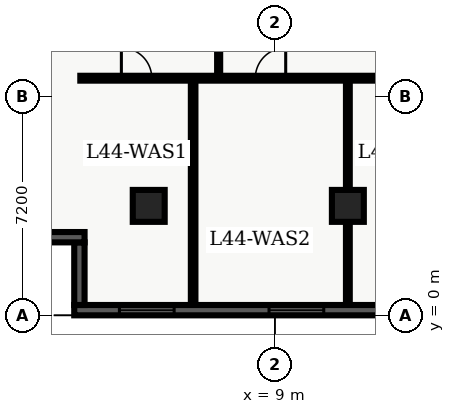
"""IFC4 building model, lengths in metres.
Left out: names, types, materials, properties, quantities, classifications, styles, units other than length and angle.
Written with IfcOpenShell. Run it as: python <this file> out.ifc"""

import sys

from ifc_helpers import new_model, entity, si_unit, converted_unit, direction, frame, origin_with_axes, origin_2d_with_axis, place, context, subcontext, project, spatial, polyline, rectangle, outline, extrude, element, fill, save


model = new_model("IFC4")
c1 = context("Model", 3, precision=1e-05, world=origin_with_axes(), true_north=direction((0.0, 1.0)))
c2 = subcontext(c1, "Body", "Model", "MODEL_VIEW")
j1 = project(units=[si_unit("LENGTHUNIT", "METRE"), converted_unit("PLANEANGLEUNIT", "DEGREE", entity("IfcPlaneAngleMeasure", 0.017), si_unit("PLANEANGLEUNIT", "RADIAN"), dimensions=[0, 0, 0, 0, 0, 0, 0])], contexts=[c1])
p1 = place(None, origin_with_axes())
s1 = spatial("IfcSite", under=j1, at=p1, CompositionType="ELEMENT")
p2 = place(p1, origin_with_axes())
s2 = spatial("IfcBuilding", under=s1, at=p2, CompositionType="ELEMENT")
p3 = place(p2, frame((0.0, 0.0, 179.7), z_axis=(0.0, 0.0, 1.0), x_axis=(1.0, 0.0, 0.0)))
s3 = spatial("IfcBuildingStorey", under=s2, at=p3, CompositionType="ELEMENT", Elevation=179.7)
for number, where, z_axis, x_axis in (
    (1, (11.4, 3.6, 0.0), (0.0, 0.0, 1.0), (1.0, 0.0, 0.0)),
    (2, (4.85, 3.6, 0.0), (0.0, 0.0, 1.0), (1.0, 0.0, 0.0)),
):
    element("IfcColumn", number, at=place(p3, frame(where, z_axis=z_axis, x_axis=x_axis)), inside=s3, PredefinedType="COLUMN", context=c2, shape_type="SweptSolid", body=[
        extrude(rectangle(XDim=1.05, YDim=1.05, at=origin_2d_with_axis()), origin_with_axes(), (0.0, 0.0, 1.0), 3.9),
    ])
p4 = place(p3, frame((2.6, 7.8, 0.0), z_axis=(0.0, 0.0, 1.0), x_axis=(1.0, 0.0, 0.0)))
e3 = element("IfcWall", 3, at=p4, inside=s3, PredefinedType="PARTITIONING", context=c2, shape_type="SweptSolid", body=[
    extrude(outline(polyline([(0.0, -0.08), (18.55, -0.08), (18.55, 0.08), (0.0, 0.08), (0.0, -0.08)])), origin_with_axes(), (0.0, 0.0, 1.0), 2.7),
])
p5 = place(p4, frame((1.851, 0.0, 0.0), z_axis=(0.0, 0.0, 1.0), x_axis=(1.0, 0.0, 0.0)))
e4 = element("IfcOpeningElement", 4, at=p5, cuts=e3, PredefinedType="OPENING", context=c2, shape_type="SweptSolid", body=[
    extrude(rectangle(XDim=1.0, YDim=0.18, at=origin_2d_with_axis()), origin_with_axes(), (0.0, 0.0, 1.0), 2.15),
])
p6 = place(p4, frame((6.255, 0.0, 0.0), z_axis=(0.0, 0.0, 1.0), x_axis=(1.0, 0.0, 0.0)))
e5 = element("IfcOpeningElement", 5, at=p6, cuts=e3, PredefinedType="OPENING", context=c2, shape_type="SweptSolid", body=[
    extrude(rectangle(XDim=1.0, YDim=0.18, at=origin_2d_with_axis()), origin_with_axes(), (0.0, 0.0, 1.0), 2.15),
])
p7 = place(p4, frame((10.794, 0.0, 0.0), z_axis=(0.0, 0.0, 1.0), x_axis=(1.0, 0.0, 0.0)))
e6 = element("IfcOpeningElement", 6, at=p7, cuts=e3, PredefinedType="OPENING", context=c2, shape_type="SweptSolid", body=[
    extrude(rectangle(XDim=1.0, YDim=0.18, at=origin_2d_with_axis()), origin_with_axes(), (0.0, 0.0, 1.0), 2.15),
])
p8 = place(p4, frame((15.645, 0.0, 0.0), z_axis=(0.0, 0.0, 1.0), x_axis=(1.0, 0.0, 0.0)))
e7 = element("IfcOpeningElement", 7, at=p8, cuts=e3, PredefinedType="OPENING", context=c2, shape_type="SweptSolid", body=[
    extrude(rectangle(XDim=1.0, YDim=0.18, at=origin_2d_with_axis()), origin_with_axes(), (0.0, 0.0, 1.0), 2.15),
])
p9 = place(p3, frame((7.15, 7.8, 0.0), z_axis=(0.0, 0.0, 1.0), x_axis=(0.0, 1.0, 0.0)))
e8 = element("IfcWall", 8, at=p9, inside=s3, PredefinedType="PARTITIONING", context=c2, shape_type="SweptSolid", body=[
    extrude(outline(polyline([(0.0, -0.05), (32.7, -0.05), (32.7, 0.05), (0.0, 0.05), (0.0, -0.05)])), origin_with_axes(), (0.0, 0.0, 1.0), 2.7),
])
p10 = place(p9, frame((7.098, 0.0, 0.0), z_axis=(0.0, 0.0, 1.0), x_axis=(1.0, 0.0, 0.0)))
e9 = element("IfcOpeningElement", 9, at=p10, cuts=e8, PredefinedType="OPENING", context=c2, shape_type="SweptSolid", body=[
    extrude(rectangle(XDim=1.0, YDim=0.12, at=origin_2d_with_axis()), origin_with_axes(), (0.0, 0.0, 1.0), 2.15),
])
p11 = place(p9, frame((23.317, 0.0, 0.0), z_axis=(0.0, 0.0, 1.0), x_axis=(1.0, 0.0, 0.0)))
e10 = element("IfcOpeningElement", 10, at=p11, cuts=e8, PredefinedType="OPENING", context=c2, shape_type="SweptSolid", body=[
    extrude(rectangle(XDim=1.0, YDim=0.12, at=origin_2d_with_axis()), origin_with_axes(), (0.0, 0.0, 1.0), 2.15),
])
p12 = place(p3, frame((6.311, 0.335, 0.0), z_axis=(0.0, 0.0, 1.0), x_axis=(0.0, 1.0, 0.0)))
e11 = element("IfcWall", 11, at=p12, inside=s3, PredefinedType="PARTITIONING", context=c2, shape_type="SweptSolid", body=[
    extrude(outline(polyline([(0.0, -0.075), (7.365, -0.075), (7.365, 0.075), (0.0, 0.075), (0.0, -0.075)])), origin_with_axes(), (0.0, 0.0, 1.0), 2.7),
])
p13 = place(p3, frame((11.4, 0.335, 0.0), z_axis=(0.0, 0.0, 1.0), x_axis=(0.0, 1.0, 0.0)))
e12 = element("IfcWall", 12, at=p13, inside=s3, PredefinedType="PARTITIONING", context=c2, shape_type="SweptSolid", body=[
    extrude(outline(polyline([(0.0, -0.062), (7.365, -0.062), (7.365, 0.062), (0.0, 0.062), (0.0, -0.062)])), origin_with_axes(), (0.0, 0.0, 1.0), 2.7),
])
p14 = place(p3, frame((57.26, 0.17, 0.0), z_axis=(0.0, 0.0, 1.0), x_axis=(-1.0, 0.0, 0.0)))
e13 = element("IfcWall", 13, at=p14, inside=s3, PredefinedType="SOLIDWALL", context=c2, shape_type="SweptSolid", body=[
    extrude(outline(polyline([(0.0, -0.17), (54.86, -0.17), (54.86, 0.17), (0.0, 0.17), (0.0, -0.17)])), origin_with_axes(), (0.0, 0.0, 1.0), 3.66),
])
p15 = place(p14, frame((2.836, 0.0, 0.45), z_axis=(0.0, 0.0, 1.0), x_axis=(1.0, 0.0, 0.0)))
e14 = element("IfcOpeningElement", 14, at=p15, cuts=e13, PredefinedType="OPENING", context=c2, shape_type="SweptSolid", body=[
    extrude(rectangle(XDim=1.8, YDim=0.36, at=origin_2d_with_axis()), origin_with_axes(), (0.0, 0.0, 1.0), 2.1),
])
p16 = place(p14, frame((7.307, 0.0, 0.45), z_axis=(0.0, 0.0, 1.0), x_axis=(1.0, 0.0, 0.0)))
e15 = element("IfcOpeningElement", 15, at=p16, cuts=e13, PredefinedType="OPENING", context=c2, shape_type="SweptSolid", body=[
    extrude(rectangle(XDim=1.8, YDim=0.36, at=origin_2d_with_axis()), origin_with_axes(), (0.0, 0.0, 1.0), 2.1),
])
p17 = place(p14, frame((11.779, 0.0, 0.45), z_axis=(0.0, 0.0, 1.0), x_axis=(1.0, 0.0, 0.0)))
e16 = element("IfcOpeningElement", 16, at=p17, cuts=e13, PredefinedType="OPENING", context=c2, shape_type="SweptSolid", body=[
    extrude(rectangle(XDim=1.8, YDim=0.36, at=origin_2d_with_axis()), origin_with_axes(), (0.0, 0.0, 1.0), 2.1),
])
p18 = place(p14, frame((16.251, 0.0, 0.45), z_axis=(0.0, 0.0, 1.0), x_axis=(1.0, 0.0, 0.0)))
e17 = element("IfcOpeningElement", 17, at=p18, cuts=e13, PredefinedType="OPENING", context=c2, shape_type="SweptSolid", body=[
    extrude(rectangle(XDim=1.8, YDim=0.36, at=origin_2d_with_axis()), origin_with_axes(), (0.0, 0.0, 1.0), 2.1),
])
p19 = place(p14, frame((20.723, 0.0, 0.45), z_axis=(0.0, 0.0, 1.0), x_axis=(1.0, 0.0, 0.0)))
e18 = element("IfcOpeningElement", 18, at=p19, cuts=e13, PredefinedType="OPENING", context=c2, shape_type="SweptSolid", body=[
    extrude(rectangle(XDim=1.8, YDim=0.36, at=origin_2d_with_axis()), origin_with_axes(), (0.0, 0.0, 1.0), 2.1),
])
p20 = place(p14, frame((34.588, 0.0, 0.45), z_axis=(0.0, 0.0, 1.0), x_axis=(1.0, 0.0, 0.0)))
e19 = element("IfcOpeningElement", 19, at=p20, cuts=e13, PredefinedType="OPENING", context=c2, shape_type="SweptSolid", body=[
    extrude(rectangle(XDim=1.8, YDim=0.36, at=origin_2d_with_axis()), origin_with_axes(), (0.0, 0.0, 1.0), 2.1),
])
p21 = place(p14, frame((38.609, 0.0, 0.45), z_axis=(0.0, 0.0, 1.0), x_axis=(1.0, 0.0, 0.0)))
e20 = element("IfcOpeningElement", 20, at=p21, cuts=e13, PredefinedType="OPENING", context=c2, shape_type="SweptSolid", body=[
    extrude(rectangle(XDim=1.8, YDim=0.36, at=origin_2d_with_axis()), origin_with_axes(), (0.0, 0.0, 1.0), 2.1),
])
p22 = place(p14, frame((43.531, 0.0, 0.45), z_axis=(0.0, 0.0, 1.0), x_axis=(1.0, 0.0, 0.0)))
e21 = element("IfcOpeningElement", 21, at=p22, cuts=e13, PredefinedType="OPENING", context=c2, shape_type="SweptSolid", body=[
    extrude(rectangle(XDim=1.8, YDim=0.36, at=origin_2d_with_axis()), origin_with_axes(), (0.0, 0.0, 1.0), 2.1),
])
p23 = place(p14, frame((47.553, 0.0, 0.45), z_axis=(0.0, 0.0, 1.0), x_axis=(1.0, 0.0, 0.0)))
e22 = element("IfcOpeningElement", 22, at=p23, cuts=e13, PredefinedType="OPENING", context=c2, shape_type="SweptSolid", body=[
    extrude(rectangle(XDim=1.8, YDim=0.36, at=origin_2d_with_axis()), origin_with_axes(), (0.0, 0.0, 1.0), 2.1),
])
p24 = place(p14, frame((52.474, 0.0, 0.45), z_axis=(0.0, 0.0, 1.0), x_axis=(1.0, 0.0, 0.0)))
e23 = element("IfcOpeningElement", 23, at=p24, cuts=e13, PredefinedType="OPENING", context=c2, shape_type="SweptSolid", body=[
    extrude(rectangle(XDim=1.8, YDim=0.36, at=origin_2d_with_axis()), origin_with_axes(), (0.0, 0.0, 1.0), 2.1),
])
p25 = place(p3, frame((2.57, 0.34, 0.0), z_axis=(0.0, 0.0, 1.0), x_axis=(0.0, 1.0, 0.0)))
e24 = element("IfcWall", 24, at=p25, inside=s3, PredefinedType="SOLIDWALL", context=c2, shape_type="SweptSolid", body=[
    extrude(outline(polyline([(0.0, -0.17), (2.06, -0.17), (2.06, 0.17), (0.0, 0.17), (0.0, -0.17)])), origin_with_axes(), (0.0, 0.0, 1.0), 3.66),
])
p26 = place(p3, frame((2.74, 2.57, 0.0), z_axis=(0.0, 0.0, 1.0), x_axis=(-1.0, 0.0, 0.0)))
e25 = element("IfcWall", 25, at=p26, inside=s3, PredefinedType="SOLIDWALL", context=c2, shape_type="SweptSolid", body=[
    extrude(outline(polyline([(0.0, -0.17), (2.74, -0.17), (2.74, 0.17), (0.0, 0.17), (0.0, -0.17)])), origin_with_axes(), (0.0, 0.0, 1.0), 3.66),
])
p27 = place(p4, frame((1.851, 0.0, 0.0), z_axis=(0.0, 0.0, 1.0), x_axis=(1.0, 0.0, 0.0)))
e26 = element("IfcDoor", 26, at=p27, inside=s3, OperationType="SINGLE_SWING_LEFT", PredefinedType="DOOR", context=c2, shape_type="SweptSolid", body=[
    extrude(rectangle(XDim=1.0, YDim=0.09, at=origin_2d_with_axis()), origin_with_axes(), (0.0, 0.0, 1.0), 2.15),
])
fill(e4, e26)
p28 = place(p4, frame((6.255, 0.0, 0.0), z_axis=(0.0, 0.0, 1.0), x_axis=(1.0, 0.0, 0.0)))
e27 = element("IfcDoor", 27, at=p28, inside=s3, OperationType="SINGLE_SWING_RIGHT", PredefinedType="DOOR", context=c2, shape_type="SweptSolid", body=[
    extrude(rectangle(XDim=1.0, YDim=0.09, at=origin_2d_with_axis()), origin_with_axes(), (0.0, 0.0, 1.0), 2.15),
])
fill(e5, e27)
p29 = place(p14, frame((47.553, 0.0, 0.45), z_axis=(0.0, 0.0, 1.0), x_axis=(1.0, 0.0, 0.0)))
e28 = element("IfcWindow", 28, at=p29, inside=s3, PredefinedType="WINDOW", context=c2, shape_type="SweptSolid", body=[
    extrude(rectangle(XDim=1.8, YDim=0.09, at=origin_2d_with_axis()), origin_with_axes(), (0.0, 0.0, 1.0), 2.1),
])
fill(e22, e28)
p30 = place(p14, frame((52.474, 0.0, 0.45), z_axis=(0.0, 0.0, 1.0), x_axis=(1.0, 0.0, 0.0)))
e29 = element("IfcWindow", 29, at=p30, inside=s3, PredefinedType="WINDOW", context=c2, shape_type="SweptSolid", body=[
    extrude(rectangle(XDim=1.8, YDim=0.09, at=origin_2d_with_axis()), origin_with_axes(), (0.0, 0.0, 1.0), 2.1),
])
fill(e23, e29)
save(model, sys.argv[1])
